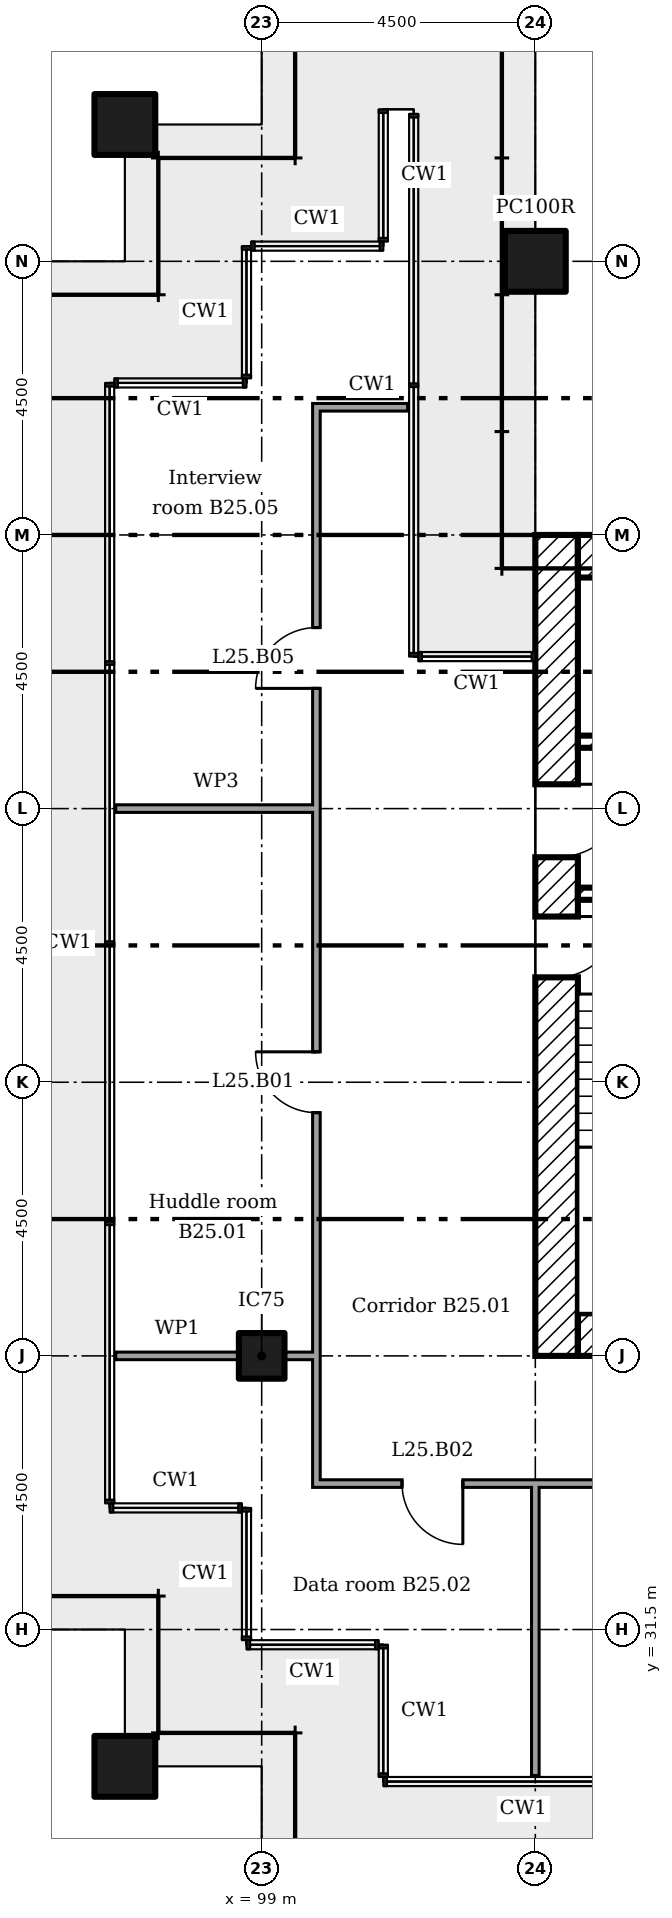
"""IFC4 building model, lengths in metres.
Left out: names, types, materials, properties, quantities, classifications, styles, units other than length and angle.
Written with IfcOpenShell. Run it as: python <this file> out.ifc"""

import sys

from ifc_helpers import new_model, si_unit, direction, frame, frame_2d, origin, origin_2d, place, context, subcontext, project, spatial, rectangle, extrude, element, fill, save


model = new_model("IFC4")
c1 = context("Model", 3, precision=1e-05, world=origin(), true_north=direction((0.0, 1.0)))
c2 = subcontext(c1, "Body", "Model", "MODEL_VIEW")
j1 = project(units=[si_unit("LENGTHUNIT", "METRE"), si_unit("PLANEANGLEUNIT", "RADIAN")], contexts=[c1])
p1 = place(None, origin())
s1 = spatial("IfcSite", under=j1, at=p1, CompositionType="ELEMENT")
p2 = place(p1, origin())
s2 = spatial("IfcBuilding", under=s1, at=p2, CompositionType="ELEMENT")
p3 = place(p2, frame((0.0, 0.0, 102.8)))
s3 = spatial("IfcBuildingStorey", under=s2, at=p3, CompositionType="ELEMENT", Elevation=102.8)
for number, where in (
    (1, (103.5, 54.0, 0.0)),
    (2, (96.75, 56.25, 0.0)),
    (3, (96.75, 29.25, 0.0)),
):
    element("IfcColumn", number, at=place(p3, frame(where)), inside=s3, PredefinedType="COLUMN", context=c2, shape_type="SweptSolid", body=[
        extrude(rectangle(XDim=1.0, YDim=1.0, at=origin_2d()), origin(), (0.0, 0.0, 1.0), 3.6),
    ])
p4 = place(p3, frame((99.0, 36.0, 0.0)))
e4 = element("IfcColumn", 4, at=p4, inside=s3, PredefinedType="COLUMN", context=c2, shape_type="SweptSolid", body=[
    extrude(rectangle(XDim=0.75, YDim=0.75, at=origin_2d()), origin(), (0.0, 0.0, 1.0), 3.6),
])
for number, where in (
    (5, (104.2, 49.15, 0.0)),
    (6, (104.2, 36.35, 0.0)),
):
    element("IfcWall", number, at=place(p3, frame(where)), inside=s3, PredefinedType="SHEAR", context=c2, shape_type="SweptSolid", body=[
        extrude(rectangle(XDim=12.1, YDim=0.7, at=frame_2d((6.05, 0.0))), origin(), (0.0, 0.0, 1.0), 3.35),
    ])
p5 = place(p3, frame((103.85, 36.0, 0.0), z_axis=(0.0, 0.0, 1.0), x_axis=(0.0, 1.0, 0.0)))
e7 = element("IfcWall", 7, at=p5, inside=s3, PredefinedType="SHEAR", context=c2, shape_type="SweptSolid", body=[
    extrude(rectangle(XDim=13.5, YDim=0.7, at=frame_2d((6.75, 0.0))), origin(), (0.0, 0.0, 1.0), 3.35),
])
p6 = place(p5, frame((8.2, 0.0, 0.0)))
e8 = element("IfcOpeningElement", 8, at=p6, cuts=e7, PredefinedType="OPENING", context=c2, shape_type="SweptSolid", body=[
    extrude(rectangle(XDim=1.2, YDim=2.1, at=frame_2d((0.6, 1.05))), frame((0.0, 0.36, 0.0), z_axis=(0.0, -1.0, 0.0), x_axis=(1.0, 0.0, 0.0)), (0.0, 0.0, 1.0), 0.72),
])
p7 = place(p5, frame((6.225, 0.0, 0.0)))
e9 = element("IfcOpeningElement", 9, at=p7, cuts=e7, PredefinedType="OPENING", context=c2, shape_type="SweptSolid", body=[
    extrude(rectangle(XDim=1.0, YDim=2.1, at=frame_2d((0.5, 1.05))), frame((0.0, 0.36, 0.0), z_axis=(0.0, -1.0, 0.0), x_axis=(1.0, 0.0, 0.0)), (0.0, 0.0, 1.0), 0.72),
])
p8 = place(p3, frame((104.2, 46.1, 0.0)))
e10 = element("IfcWall", 10, at=p8, inside=s3, PredefinedType="SHEAR", context=c2, shape_type="SweptSolid", body=[
    extrude(rectangle(XDim=3.133, YDim=0.2, at=frame_2d((1.567, 0.0))), origin(), (0.0, 0.0, 1.0), 3.35),
])
p9 = place(p8, frame((1.317, 0.0, 0.0)))
e11 = element("IfcOpeningElement", 11, at=p9, cuts=e10, PredefinedType="OPENING", context=c2, shape_type="SweptSolid", body=[
    extrude(rectangle(XDim=0.9, YDim=2.1, at=frame_2d((0.45, 1.05))), frame((0.0, 0.11, 0.0), z_axis=(0.0, -1.0, 0.0), x_axis=(1.0, 0.0, 0.0)), (0.0, 0.0, 1.0), 0.22),
])
p10 = place(p3, frame((104.2, 43.6, 0.0)))
e12 = element("IfcWall", 12, at=p10, inside=s3, PredefinedType="SHEAR", context=c2, shape_type="SweptSolid", body=[
    extrude(rectangle(XDim=2.8, YDim=0.2, at=frame_2d((1.4, 0.0))), origin(), (0.0, 0.0, 1.0), 3.35),
])
p11 = place(p10, frame((1.05, 0.0, 0.0)))
e13 = element("IfcOpeningElement", 13, at=p11, cuts=e12, PredefinedType="OPENING", context=c2, shape_type="SweptSolid", body=[
    extrude(rectangle(XDim=1.0, YDim=2.1, at=frame_2d((0.5, 1.05))), frame((0.0, 0.11, 0.0), z_axis=(0.0, -1.0, 0.0), x_axis=(1.0, 0.0, 0.0)), (0.0, 0.0, 1.0), 0.22),
])
p12 = place(p3, frame((99.837, 33.9, 0.0)))
e14 = element("IfcWall", 14, at=p12, inside=s3, PredefinedType="PARTITIONING", context=c2, shape_type="SweptSolid", body=[
    extrude(rectangle(XDim=20.225, YDim=0.125, at=frame_2d((10.113, 0.0))), origin(), (0.0, 0.0, 1.0), 3.45),
])
p13 = place(p12, frame((1.47, 0.0, 0.0)))
e15 = element("IfcOpeningElement", 15, at=p13, cuts=e14, PredefinedType="OPENING", context=c2, shape_type="SweptSolid", body=[
    extrude(rectangle(XDim=1.0, YDim=2.1, at=frame_2d((0.5, 1.05))), frame((0.0, 0.073, 0.0), z_axis=(0.0, -1.0, 0.0), x_axis=(1.0, 0.0, 0.0)), (0.0, 0.0, 1.0), 0.145),
])
p14 = place(p12, frame((11.942, 0.0, 0.0)))
e16 = element("IfcOpeningElement", 16, at=p14, cuts=e14, PredefinedType="OPENING", context=c2, shape_type="SweptSolid", body=[
    extrude(rectangle(XDim=1.0, YDim=2.1, at=frame_2d((0.5, 1.05))), frame((0.0, 0.073, 0.0), z_axis=(0.0, -1.0, 0.0), x_axis=(1.0, 0.0, 0.0)), (0.0, 0.0, 1.0), 0.145),
])
p15 = place(p3, frame((96.6, 36.0, 0.0)))
e17 = element("IfcWall", 17, at=p15, inside=s3, PredefinedType="PARTITIONING", context=c2, shape_type="SweptSolid", body=[
    extrude(rectangle(XDim=2.025, YDim=0.125, at=frame_2d((1.012, 0.0))), origin(), (0.0, 0.0, 1.0), 2.842),
])
p16 = place(p3, frame((99.375, 36.0, 0.0)))
e18 = element("IfcWall", 18, at=p16, inside=s3, PredefinedType="PARTITIONING", context=c2, shape_type="SweptSolid", body=[
    extrude(rectangle(XDim=0.525, YDim=0.125, at=frame_2d((0.262, 0.0))), origin(), (0.0, 0.0, 1.0), 2.842),
])
p17 = place(p3, frame((96.6, 45.0, 0.0)))
e19 = element("IfcWall", 19, at=p17, inside=s3, PredefinedType="MOVABLE", context=c2, shape_type="SweptSolid", body=[
    extrude(rectangle(XDim=3.3, YDim=0.125, at=frame_2d((1.65, 0.0))), origin(), (0.0, 0.0, 1.0), 2.851),
])
p18 = place(p3, frame((99.837, 51.6, 0.0)))
e20 = element("IfcWall", 20, at=p18, inside=s3, PredefinedType="PARTITIONING", context=c2, shape_type="SweptSolid", body=[
    extrude(rectangle(XDim=1.562, YDim=0.125, at=frame_2d((0.781, 0.0))), origin(), (0.0, 0.0, 1.0), 3.45),
])
p19 = place(p3, frame((99.9, 33.962, 0.0), z_axis=(0.0, 0.0, 1.0), x_axis=(0.0, 1.0, 0.0)))
e21 = element("IfcWall", 21, at=p19, inside=s3, PredefinedType="PARTITIONING", context=c2, shape_type="SweptSolid", body=[
    extrude(rectangle(XDim=17.575, YDim=0.125, at=frame_2d((8.788, 0.0))), origin(), (0.0, 0.0, 1.0), 3.45),
])
p20 = place(p19, frame((6.038, 0.0, 0.0)))
e22 = element("IfcOpeningElement", 22, at=p20, cuts=e21, PredefinedType="OPENING", context=c2, shape_type="SweptSolid", body=[
    extrude(rectangle(XDim=1.0, YDim=2.1, at=frame_2d((0.5, 1.05))), frame((0.0, 0.073, 0.0), z_axis=(0.0, -1.0, 0.0), x_axis=(1.0, 0.0, 0.0)), (0.0, 0.0, 1.0), 0.145),
])
p21 = place(p19, frame((13.014, 0.0, 0.0)))
e23 = element("IfcOpeningElement", 23, at=p21, cuts=e21, PredefinedType="OPENING", context=c2, shape_type="SweptSolid", body=[
    extrude(rectangle(XDim=1.0, YDim=2.1, at=frame_2d((0.5, 1.05))), frame((0.0, 0.073, 0.0), z_axis=(0.0, -1.0, 0.0), x_axis=(1.0, 0.0, 0.0)), (0.0, 0.0, 1.0), 0.145),
])
p22 = place(p3, frame((103.5, 29.1, 0.0), z_axis=(0.0, 0.0, 1.0), x_axis=(0.0, 1.0, 0.0)))
e24 = element("IfcWall", 24, at=p22, inside=s3, PredefinedType="PARTITIONING", context=c2, shape_type="SweptSolid", body=[
    extrude(rectangle(XDim=4.8, YDim=0.125, at=frame_2d((2.4, 0.0))), origin(), (0.0, 0.0, 1.0), 2.851),
])
p23 = place(p6, frame((1.2, 0.0, 0.0), x_axis=(-1.0, 0.0, 0.0)))
e25 = element("IfcDoor", 25, at=p23, inside=s3, OperationType="SINGLE_SWING_RIGHT", PredefinedType="DOOR", context=c2, shape_type="SweptSolid", body=[
    extrude(rectangle(XDim=1.2, YDim=2.1, at=frame_2d((0.6, 1.05))), frame((0.0, 0.025, 0.0), z_axis=(0.0, -1.0, 0.0), x_axis=(1.0, 0.0, 0.0)), (0.0, 0.0, 1.0), 0.05),
])
fill(e8, e25)
p24 = place(p7, frame((1.0, 0.0, 0.0), x_axis=(-1.0, 0.0, 0.0)))
e26 = element("IfcDoor", 26, at=p24, inside=s3, OperationType="SINGLE_SWING_RIGHT", PredefinedType="DOOR", context=c2, shape_type="SweptSolid", body=[
    extrude(rectangle(XDim=1.0, YDim=2.1, at=frame_2d((0.5, 1.05))), frame((0.0, 0.025, 0.0), z_axis=(0.0, -1.0, 0.0), x_axis=(1.0, 0.0, 0.0)), (0.0, 0.0, 1.0), 0.05),
])
fill(e9, e26)
p25 = place(p20, origin())
e27 = element("IfcDoor", 27, at=p25, inside=s3, OperationType="SINGLE_SWING_LEFT", PredefinedType="DOOR", context=c2, shape_type="SweptSolid", body=[
    extrude(rectangle(XDim=1.0, YDim=2.1, at=frame_2d((0.5, 1.05))), frame((0.0, 0.025, 0.0), z_axis=(0.0, -1.0, 0.0), x_axis=(1.0, 0.0, 0.0)), (0.0, 0.0, 1.0), 0.05),
])
fill(e22, e27)
p26 = place(p13, frame((1.0, 0.0, 0.0), x_axis=(-1.0, 0.0, 0.0)))
e28 = element("IfcDoor", 28, at=p26, inside=s3, OperationType="SINGLE_SWING_RIGHT", PredefinedType="DOOR", context=c2, shape_type="SweptSolid", body=[
    extrude(rectangle(XDim=1.0, YDim=2.1, at=frame_2d((0.5, 1.05))), frame((0.0, 0.025, 0.0), z_axis=(0.0, -1.0, 0.0), x_axis=(1.0, 0.0, 0.0)), (0.0, 0.0, 1.0), 0.05),
])
fill(e15, e28)
p27 = place(p21, origin())
e29 = element("IfcDoor", 29, at=p27, inside=s3, OperationType="SINGLE_SWING_RIGHT", PredefinedType="DOOR", context=c2, shape_type="SweptSolid", body=[
    extrude(rectangle(XDim=1.0, YDim=2.1, at=frame_2d((0.5, 1.05))), frame((0.0, 0.025, 0.0), z_axis=(0.0, -1.0, 0.0), x_axis=(1.0, 0.0, 0.0)), (0.0, 0.0, 1.0), 0.05),
])
fill(e23, e29)
save(model, sys.argv[1])
